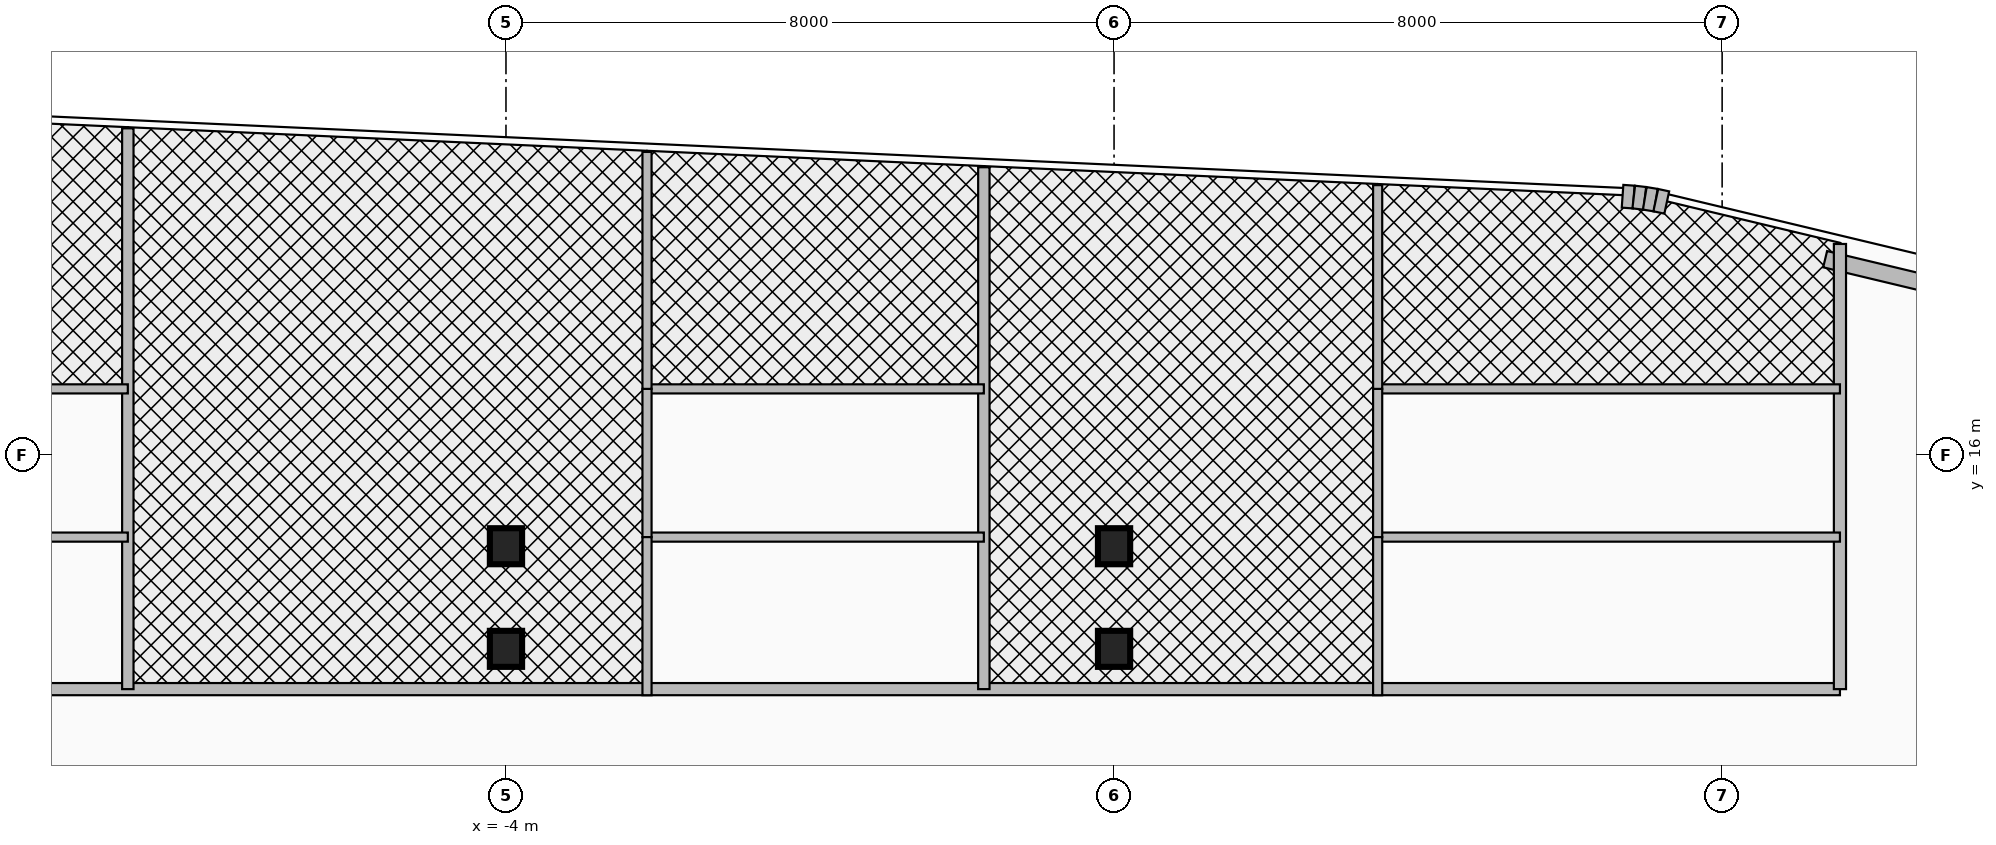
"""IFC4 building model, lengths in metres.
Left out: names, types, materials, properties, quantities, classifications, styles, units other than length and angle.
Written with IfcOpenShell. Run it as: python <this file> out.ifc"""

import sys

from ifc_helpers import new_model, si_unit, direction, frame, frame_2d, origin, origin_2d, place, context, subcontext, project, spatial, rectangle, i_section, extrude, source, transform, mapped, element, fill, save


model = new_model("IFC4")
c1 = context("Model", 3, precision=1e-05, world=origin(), true_north=direction((0.0, 1.0)))
c2 = subcontext(c1, "Body", "Model", "MODEL_VIEW")
j1 = project(units=[si_unit("LENGTHUNIT", "METRE"), si_unit("PLANEANGLEUNIT", "RADIAN")], contexts=[c1])
p1 = place(None, origin())
s1 = spatial("IfcSite", under=j1, at=p1, CompositionType="ELEMENT")
p2 = place(p1, origin())
s2 = spatial("IfcBuilding", under=s1, at=p2, CompositionType="ELEMENT")
p3 = place(p2, frame((0.0, 0.0, 131.6)))
s3 = spatial("IfcBuildingStorey", under=s2, at=p3, CompositionType="ELEMENT", Elevation=131.6)
m1 = source(origin(), c2, "Body", "SweptSolid", [
    extrude(i_section(OverallWidth=0.424, OverallDepth=0.474, WebThickness=0.048, FlangeThickness=0.077, at=origin_2d()), origin(), (0.0, 0.0, 1.0), 3.7),
])
for number, where, z_axis, x_axis in (
    (1, (-4.0, 13.45, 0.0), (0.0, 0.0, 1.0), (1.0, 0.0, 0.0)),
    (2, (-4.0, 14.8, 0.0), (0.0, 0.0, 1.0), (1.0, 0.0, 0.0)),
    (3, (4.0, 13.45, 0.0), (0.0, 0.0, 1.0), (1.0, 0.0, 0.0)),
    (4, (4.0, 14.8, 0.0), (0.0, 0.0, 1.0), (1.0, 0.0, 0.0)),
):
    element("IfcColumn", number, at=place(p3, frame(where, z_axis=z_axis, x_axis=x_axis)), inside=s3, PredefinedType="COLUMN", context=c2, shape_type="MappedRepresentation", body=[
        mapped(m1, transform((0.0, 0.0, 0.0), x_axis=(1.0, 0.0, 0.0), y_axis=(0.0, 1.0, 0.0), z_axis=(0.0, 0.0, 1.0), scale=1.0)),
    ])
p4 = place(p3, frame((10.69, 19.404, 0.0), z_axis=(0.0, 0.0, 1.0), x_axis=(0.99758310784, -0.069483400546, 0.0)))
e5 = element("IfcWall", 5, at=p4, inside=s3, PredefinedType="SOLIDWALL", context=c2, shape_type="SweptSolid", body=[
    extrude(rectangle(XDim=0.147, YDim=0.3, at=frame_2d((0.074, 0.0))), origin(), (0.0, 0.0, 1.0), 3.46),
])
for number, where, z_axis, x_axis in (
    (6, (10.837, 19.394, 0.0), (0.0, 0.0, 1.0), (0.993, -0.117, 0.0)),
    (7, (10.983, 19.377, 0.0), (0.0, 0.0, 1.0), (0.987, -0.163, 0.0)),
):
    element("IfcWall", number, at=place(p3, frame(where, z_axis=z_axis, x_axis=x_axis)), inside=s3, PredefinedType="SOLIDWALL", context=c2, shape_type="SweptSolid", body=[
        extrude(rectangle(XDim=0.146, YDim=0.3, at=frame_2d((0.073, 0.0))), origin(), (0.0, 0.0, 1.0), 3.46),
    ])
p5 = place(p3, frame((11.127, 19.353, 0.0), z_axis=(0.0, 0.0, 1.0), x_axis=(0.978019841688, -0.208511844421, 0.0)))
e8 = element("IfcWall", 8, at=p5, inside=s3, PredefinedType="SOLIDWALL", context=c2, shape_type="SweptSolid", body=[
    extrude(rectangle(XDim=0.147, YDim=0.3, at=frame_2d((0.074, 0.0))), origin(), (0.0, 0.0, 1.0), 3.46),
])
p6 = place(p3, frame((13.355, 18.576, 0.0), z_axis=(0.0, 0.0, 1.0), x_axis=(0.97252211384, -0.232810519721, 0.0)))
e9 = element("IfcWall", 9, at=p6, inside=s3, PredefinedType="SOLIDWALL", context=c2, shape_type="SweptSolid", body=[
    extrude(rectangle(XDim=2.2, YDim=0.22, at=frame_2d((1.1, 0.0))), origin(), (0.0, 0.0, 1.0), 3.46),
])
p7 = place(p6, frame((0.65, 0.0, 0.95)))
e10 = element("IfcOpeningElement", 10, at=p7, cuts=e9, PredefinedType="OPENING", context=c2, shape_type="SweptSolid", body=[
    extrude(rectangle(XDim=0.9, YDim=1.3, at=frame_2d((0.45, 0.65))), frame((0.0, 0.125, 0.0), z_axis=(0.0, -1.0, 0.0), x_axis=(1.0, 0.0, 0.0)), (0.0, 0.0, 1.0), 0.25),
])
p8 = place(p3, frame((-28.25, 12.92, 0.0), z_axis=(0.0, 0.0, 1.0), x_axis=(1.0, 0.0, 0.0)))
e11 = element("IfcWall", 11, at=p8, inside=s3, PredefinedType="PARTITIONING", context=c2, shape_type="SweptSolid", body=[
    extrude(rectangle(XDim=41.8, YDim=0.16, at=frame_2d((20.9, 0.0))), origin(), (0.0, 0.0, 1.0), 2.666),
])
p9 = place(p8, frame((0.763, 0.0, 0.0)))
e12 = element("IfcOpeningElement", 12, at=p9, cuts=e11, PredefinedType="OPENING", context=c2, shape_type="SweptSolid", body=[
    extrude(rectangle(XDim=0.95, YDim=2.15, at=frame_2d((0.475, 1.075))), frame((0.0, 0.095, 0.0), z_axis=(0.0, -1.0, 0.0), x_axis=(1.0, 0.0, 0.0)), (0.0, 0.0, 1.0), 0.19),
])
p10 = place(p8, frame((10.696, 0.0, 0.0)))
e13 = element("IfcOpeningElement", 13, at=p10, cuts=e11, PredefinedType="OPENING", context=c2, shape_type="SweptSolid", body=[
    extrude(rectangle(XDim=0.95, YDim=2.15, at=frame_2d((0.475, 1.075))), frame((0.0, 0.095, 0.0), z_axis=(0.0, -1.0, 0.0), x_axis=(1.0, 0.0, 0.0)), (0.0, 0.0, 1.0), 0.19),
])
p11 = place(p8, frame((22.215, 0.0, 0.0)))
e14 = element("IfcOpeningElement", 14, at=p11, cuts=e11, PredefinedType="OPENING", context=c2, shape_type="SweptSolid", body=[
    extrude(rectangle(XDim=0.95, YDim=2.15, at=frame_2d((0.475, 1.075))), frame((0.0, 0.095, 0.0), z_axis=(0.0, -1.0, 0.0), x_axis=(1.0, 0.0, 0.0)), (0.0, 0.0, 1.0), 0.19),
])
p12 = place(p8, frame((32.652, 0.0, 0.0)))
e15 = element("IfcOpeningElement", 15, at=p12, cuts=e11, PredefinedType="OPENING", context=c2, shape_type="SweptSolid", body=[
    extrude(rectangle(XDim=0.95, YDim=2.15, at=frame_2d((0.475, 1.075))), frame((0.0, 0.095, 0.0), z_axis=(0.0, -1.0, 0.0), x_axis=(1.0, 0.0, 0.0)), (0.0, 0.0, 1.0), 0.19),
])
p13 = place(p3, frame((13.55, 12.92, 0.0), z_axis=(0.0, 0.0, 1.0), x_axis=(0.0, 1.0, 0.0)))
e16 = element("IfcWall", 16, at=p13, inside=s3, PredefinedType="PARTITIONING", context=c2, shape_type="SweptSolid", body=[
    extrude(rectangle(XDim=5.857, YDim=0.16, at=frame_2d((2.928, 0.0))), origin(), (0.0, 0.0, 1.0), 2.666),
])
p14 = place(p3, frame((-8.975, 12.92, 0.0), z_axis=(0.0, 0.0, 1.0), x_axis=(0.0, 1.0, 0.0)))
e17 = element("IfcWall", 17, at=p14, inside=s3, PredefinedType="PARTITIONING", context=c2, shape_type="SweptSolid", body=[
    extrude(rectangle(XDim=7.378, YDim=0.15, at=frame_2d((3.689, 0.0))), origin(), (0.0, 0.0, 1.0), 2.666),
])
p15 = place(p3, frame((2.287, 12.92, 0.0), z_axis=(0.0, 0.0, 1.0), x_axis=(0.0, 1.0, 0.0)))
e18 = element("IfcWall", 18, at=p15, inside=s3, PredefinedType="PARTITIONING", context=c2, shape_type="SweptSolid", body=[
    extrude(rectangle(XDim=6.866, YDim=0.15, at=frame_2d((3.433, 0.0))), origin(), (0.0, 0.0, 1.0), 2.666),
])
p16 = place(p3, frame((-14.658, 14.92, 0.0), z_axis=(0.0, 0.0, 1.0), x_axis=(1.0, 0.0, 0.0)))
e19 = element("IfcWall", 19, at=p16, inside=s3, PredefinedType="PARTITIONING", context=c2, shape_type="SweptSolid", body=[
    extrude(rectangle(XDim=5.683, YDim=0.12, at=frame_2d((2.842, 0.0))), origin(), (0.0, 0.0, 1.0), 2.666),
])
p17 = place(p3, frame((-14.658, 16.87, 0.0), z_axis=(0.0, 0.0, 1.0), x_axis=(1.0, 0.0, 0.0)))
e20 = element("IfcWall", 20, at=p17, inside=s3, PredefinedType="PARTITIONING", context=c2, shape_type="SweptSolid", body=[
    extrude(rectangle(XDim=5.683, YDim=0.12, at=frame_2d((2.842, 0.0))), origin(), (0.0, 0.0, 1.0), 3.46),
])
p18 = place(p3, frame((-2.145, 14.92, 0.0), z_axis=(0.0, 0.0, 1.0), x_axis=(1.0, 0.0, 0.0)))
e21 = element("IfcWall", 21, at=p18, inside=s3, PredefinedType="PARTITIONING", context=c2, shape_type="SweptSolid", body=[
    extrude(rectangle(XDim=4.432, YDim=0.12, at=frame_2d((2.216, 0.0))), origin(), (0.0, 0.0, 1.0), 2.666),
])
p19 = place(p3, frame((-2.145, 16.87, 0.0), z_axis=(0.0, 0.0, 1.0), x_axis=(1.0, 0.0, 0.0)))
e22 = element("IfcWall", 22, at=p19, inside=s3, PredefinedType="PARTITIONING", context=c2, shape_type="SweptSolid", body=[
    extrude(rectangle(XDim=4.432, YDim=0.12, at=frame_2d((2.216, 0.0))), origin(), (0.0, 0.0, 1.0), 3.46),
])
p20 = place(p3, frame((-2.145, 14.92, 0.0), z_axis=(0.0, 0.0, 1.0), x_axis=(0.0, 1.0, 0.0)))
e23 = element("IfcWall", 23, at=p20, inside=s3, PredefinedType="PARTITIONING", context=c2, shape_type="SweptSolid", body=[
    extrude(rectangle(XDim=1.95, YDim=0.12, at=frame_2d((0.975, 0.0))), origin(), (0.0, 0.0, 1.0), 2.666),
])
p21 = place(p20, frame((0.55, 0.0, 0.0)))
e24 = element("IfcOpeningElement", 24, at=p21, cuts=e23, PredefinedType="OPENING", context=c2, shape_type="SweptSolid", body=[
    extrude(rectangle(XDim=0.85, YDim=2.1, at=frame_2d((0.425, 1.05))), frame((0.0, 0.075, 0.0), z_axis=(0.0, -1.0, 0.0), x_axis=(1.0, 0.0, 0.0)), (0.0, 0.0, 1.0), 0.15),
])
p22 = place(p3, frame((-2.145, 12.84, 0.0), z_axis=(0.0, 0.0, 1.0), x_axis=(0.0, 1.0, 0.0)))
e25 = element("IfcWall", 25, at=p22, inside=s3, PredefinedType="PARTITIONING", context=c2, shape_type="SweptSolid", body=[
    extrude(rectangle(XDim=2.08, YDim=0.12, at=frame_2d((1.04, 0.0))), origin(), (0.0, 0.0, 1.0), 2.666),
])
p23 = place(p22, frame((0.55, 0.0, 0.0)))
e26 = element("IfcOpeningElement", 26, at=p23, cuts=e25, PredefinedType="OPENING", context=c2, shape_type="SweptSolid", body=[
    extrude(rectangle(XDim=0.9, YDim=2.1, at=frame_2d((0.45, 1.05))), frame((0.0, 0.075, 0.0), z_axis=(0.0, -1.0, 0.0), x_axis=(1.0, 0.0, 0.0)), (0.0, 0.0, 1.0), 0.15),
])
p24 = place(p3, frame((-2.145, 16.87, 0.0), z_axis=(0.0, 0.0, 1.0), x_axis=(0.0, 1.0, 0.0)))
e27 = element("IfcWall", 27, at=p24, inside=s3, PredefinedType="PARTITIONING", context=c2, shape_type="SweptSolid", body=[
    extrude(rectangle(XDim=3.117, YDim=0.12, at=frame_2d((1.559, 0.0))), origin(), (0.0, 0.0, 1.0), 3.46),
])
p25 = place(p24, frame((1.109, 0.0, 0.0)))
e28 = element("IfcOpeningElement", 28, at=p25, cuts=e27, PredefinedType="OPENING", context=c2, shape_type="SweptSolid", body=[
    extrude(rectangle(XDim=0.9, YDim=2.1, at=frame_2d((0.45, 1.05))), frame((0.0, 0.075, 0.0), z_axis=(0.0, -1.0, 0.0), x_axis=(1.0, 0.0, 0.0)), (0.0, 0.0, 1.0), 0.15),
])
for number, where, z_axis, x_axis in (
    (29, (7.468, 14.92, 0.0), (0.0, 0.0, 1.0), (1.0, 0.0, 0.0)),
    (30, (7.468, 16.87, 0.0), (0.0, 0.0, 1.0), (1.0, 0.0, 0.0)),
):
    element("IfcWall", number, at=place(p3, frame(where, z_axis=z_axis, x_axis=x_axis)), inside=s3, PredefinedType="PARTITIONING", context=c2, shape_type="SweptSolid", body=[
        extrude(rectangle(XDim=6.082, YDim=0.12, at=frame_2d((3.041, 0.0))), origin(), (0.0, 0.0, 1.0), 3.46),
    ])
p26 = place(p3, frame((7.468, 14.92, 0.0), z_axis=(0.0, 0.0, 1.0), x_axis=(0.0, 1.0, 0.0)))
e31 = element("IfcWall", 31, at=p26, inside=s3, PredefinedType="PARTITIONING", context=c2, shape_type="SweptSolid", body=[
    extrude(rectangle(XDim=1.95, YDim=0.12, at=frame_2d((0.975, 0.0))), origin(), (0.0, 0.0, 1.0), 3.46),
])
p27 = place(p26, frame((0.55, 0.0, 0.0)))
e32 = element("IfcOpeningElement", 32, at=p27, cuts=e31, PredefinedType="OPENING", context=c2, shape_type="SweptSolid", body=[
    extrude(rectangle(XDim=0.85, YDim=2.1, at=frame_2d((0.425, 1.05))), frame((0.0, 0.075, 0.0), z_axis=(0.0, -1.0, 0.0), x_axis=(1.0, 0.0, 0.0)), (0.0, 0.0, 1.0), 0.15),
])
p28 = place(p3, frame((7.468, 12.84, 0.0), z_axis=(0.0, 0.0, 1.0), x_axis=(0.0, 1.0, 0.0)))
e33 = element("IfcWall", 33, at=p28, inside=s3, PredefinedType="PARTITIONING", context=c2, shape_type="SweptSolid", body=[
    extrude(rectangle(XDim=2.08, YDim=0.12, at=frame_2d((1.04, 0.0))), origin(), (0.0, 0.0, 1.0), 2.666),
])
p29 = place(p28, frame((0.55, 0.0, 0.0)))
e34 = element("IfcOpeningElement", 34, at=p29, cuts=e33, PredefinedType="OPENING", context=c2, shape_type="SweptSolid", body=[
    extrude(rectangle(XDim=0.9, YDim=2.1, at=frame_2d((0.45, 1.05))), frame((0.0, 0.075, 0.0), z_axis=(0.0, -1.0, 0.0), x_axis=(1.0, 0.0, 0.0)), (0.0, 0.0, 1.0), 0.15),
])
p30 = place(p3, frame((7.468, 16.87, 0.0), z_axis=(0.0, 0.0, 1.0), x_axis=(0.0, 1.0, 0.0)))
e35 = element("IfcWall", 35, at=p30, inside=s3, PredefinedType="PARTITIONING", context=c2, shape_type="SweptSolid", body=[
    extrude(rectangle(XDim=2.68, YDim=0.12, at=frame_2d((1.34, 0.0))), origin(), (0.0, 0.0, 1.0), 3.46),
])
p31 = place(p30, frame((0.89, 0.0, 0.0)))
e36 = element("IfcOpeningElement", 36, at=p31, cuts=e35, PredefinedType="OPENING", context=c2, shape_type="SweptSolid", body=[
    extrude(rectangle(XDim=0.9, YDim=2.1, at=frame_2d((0.45, 1.05))), frame((0.0, 0.075, 0.0), z_axis=(0.0, -1.0, 0.0), x_axis=(1.0, 0.0, 0.0)), (0.0, 0.0, 1.0), 0.15),
])
p32 = place(p7, origin())
e37 = element("IfcWindow", 37, at=p32, inside=s3, PartitioningType="SINGLE_PANEL", PredefinedType="WINDOW", context=c2, shape_type="SweptSolid", body=[
    extrude(rectangle(XDim=0.9, YDim=1.3, at=frame_2d((0.45, 0.65))), frame((0.0, 0.03, 0.0), z_axis=(0.0, -1.0, 0.0), x_axis=(1.0, 0.0, 0.0)), (0.0, 0.0, 1.0), 0.06),
])
fill(e10, e37)
p33 = place(p11, origin())
e38 = element("IfcDoor", 38, at=p33, inside=s3, OperationType="SINGLE_SWING_RIGHT", PredefinedType="DOOR", context=c2, shape_type="SweptSolid", body=[
    extrude(rectangle(XDim=0.95, YDim=2.15, at=frame_2d((0.475, 1.075))), frame((0.0, 0.025, 0.0), z_axis=(0.0, -1.0, 0.0), x_axis=(1.0, 0.0, 0.0)), (0.0, 0.0, 1.0), 0.05),
])
fill(e14, e38)
p34 = place(p21, origin())
e39 = element("IfcDoor", 39, at=p34, inside=s3, OperationType="SINGLE_SWING_LEFT", PredefinedType="DOOR", context=c2, shape_type="SweptSolid", body=[
    extrude(rectangle(XDim=0.85, YDim=2.1, at=frame_2d((0.425, 1.05))), frame((0.0, 0.025, 0.0), z_axis=(0.0, -1.0, 0.0), x_axis=(1.0, 0.0, 0.0)), (0.0, 0.0, 1.0), 0.05),
])
fill(e24, e39)
p35 = place(p23, origin())
e40 = element("IfcDoor", 40, at=p35, inside=s3, OperationType="SINGLE_SWING_RIGHT", PredefinedType="DOOR", context=c2, shape_type="SweptSolid", body=[
    extrude(rectangle(XDim=0.9, YDim=2.1, at=frame_2d((0.45, 1.05))), frame((0.0, 0.025, 0.0), z_axis=(0.0, -1.0, 0.0), x_axis=(1.0, 0.0, 0.0)), (0.0, 0.0, 1.0), 0.05),
])
fill(e26, e40)
p36 = place(p25, frame((0.9, 0.0, 0.0), z_axis=(0.0, 0.0, 1.0), x_axis=(-1.0, 0.0, 0.0)))
e41 = element("IfcDoor", 41, at=p36, inside=s3, OperationType="SINGLE_SWING_LEFT", PredefinedType="DOOR", context=c2, shape_type="SweptSolid", body=[
    extrude(rectangle(XDim=0.9, YDim=2.1, at=frame_2d((0.45, 1.05))), frame((0.0, 0.025, 0.0), z_axis=(0.0, -1.0, 0.0), x_axis=(1.0, 0.0, 0.0)), (0.0, 0.0, 1.0), 0.05),
])
fill(e28, e41)
p37 = place(p12, origin())
e42 = element("IfcDoor", 42, at=p37, inside=s3, OperationType="SINGLE_SWING_RIGHT", PredefinedType="DOOR", context=c2, shape_type="SweptSolid", body=[
    extrude(rectangle(XDim=0.95, YDim=2.15, at=frame_2d((0.475, 1.075))), frame((0.0, 0.025, 0.0), z_axis=(0.0, -1.0, 0.0), x_axis=(1.0, 0.0, 0.0)), (0.0, 0.0, 1.0), 0.05),
])
fill(e15, e42)
p38 = place(p27, origin())
e43 = element("IfcDoor", 43, at=p38, inside=s3, OperationType="SINGLE_SWING_LEFT", PredefinedType="DOOR", context=c2, shape_type="SweptSolid", body=[
    extrude(rectangle(XDim=0.85, YDim=2.1, at=frame_2d((0.425, 1.05))), frame((0.0, 0.025, 0.0), z_axis=(0.0, -1.0, 0.0), x_axis=(1.0, 0.0, 0.0)), (0.0, 0.0, 1.0), 0.05),
])
fill(e32, e43)
p39 = place(p29, origin())
e44 = element("IfcDoor", 44, at=p39, inside=s3, OperationType="SINGLE_SWING_RIGHT", PredefinedType="DOOR", context=c2, shape_type="SweptSolid", body=[
    extrude(rectangle(XDim=0.9, YDim=2.1, at=frame_2d((0.45, 1.05))), frame((0.0, 0.025, 0.0), z_axis=(0.0, -1.0, 0.0), x_axis=(1.0, 0.0, 0.0)), (0.0, 0.0, 1.0), 0.05),
])
fill(e34, e44)
p40 = place(p31, frame((0.9, 0.0, 0.0), z_axis=(0.0, 0.0, 1.0), x_axis=(-1.0, 0.0, 0.0)))
e45 = element("IfcDoor", 45, at=p40, inside=s3, OperationType="SINGLE_SWING_LEFT", PredefinedType="DOOR", context=c2, shape_type="SweptSolid", body=[
    extrude(rectangle(XDim=0.9, YDim=2.1, at=frame_2d((0.45, 1.05))), frame((0.0, 0.025, 0.0), z_axis=(0.0, -1.0, 0.0), x_axis=(1.0, 0.0, 0.0)), (0.0, 0.0, 1.0), 0.05),
])
fill(e36, e45)
save(model, sys.argv[1])
